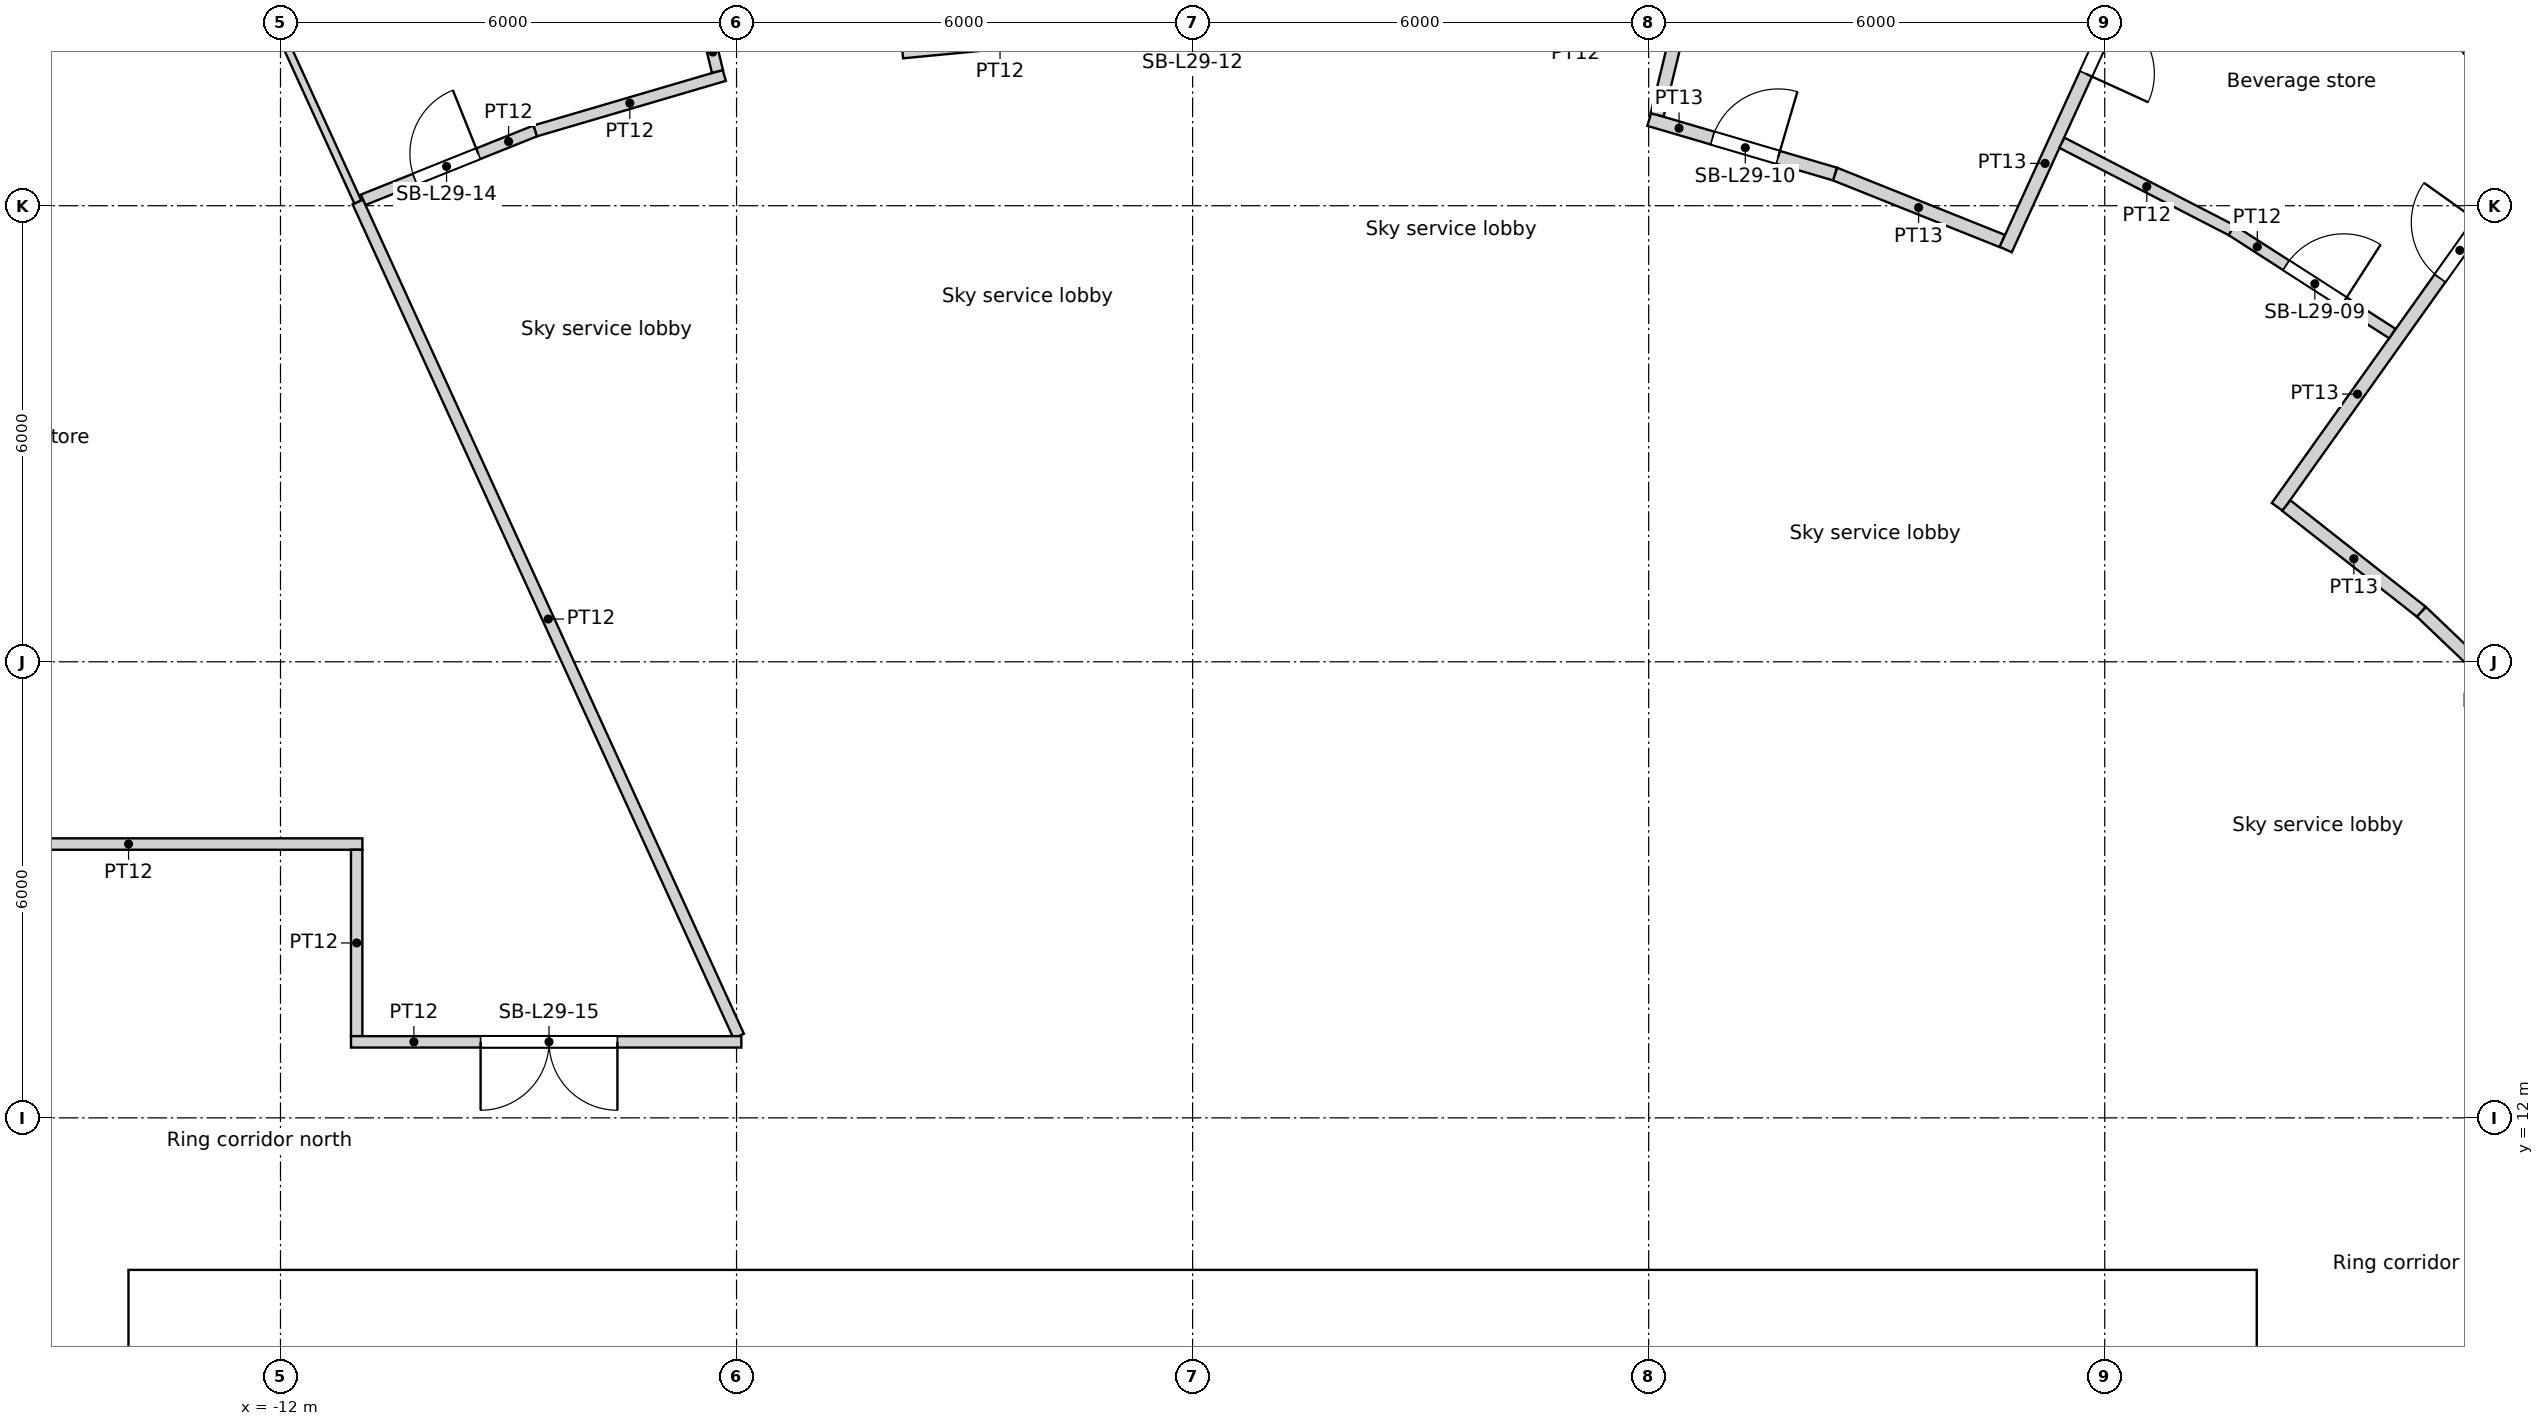
"""IFC4 building model, lengths in metres.
Left out: names, types, materials, properties, quantities, classifications, styles, units other than length and angle.
Written with IfcOpenShell. Run it as: python <this file> out.ifc"""

import sys

from ifc_helpers import new_model, si_unit, direction, frame, frame_2d, origin, origin_2d, place, context, subcontext, project, spatial, rectangle, circle, extrude, element, fill, save


model = new_model("IFC4")
c1 = context("Model", 3, precision=1e-05, world=origin(), true_north=direction((0.0, 1.0)))
c2 = subcontext(c1, "Body", "Model", "MODEL_VIEW")
j1 = project(units=[si_unit("LENGTHUNIT", "METRE"), si_unit("PLANEANGLEUNIT", "RADIAN")], contexts=[c1])
p1 = place(None, origin())
s1 = spatial("IfcSite", under=j1, at=p1, CompositionType="ELEMENT")
p2 = place(p1, origin())
s2 = spatial("IfcBuilding", under=s1, at=p2, CompositionType="ELEMENT")
p3 = place(p2, frame((0.0, 0.0, 114.6)))
s3 = spatial("IfcBuildingStorey", under=s2, at=p3, CompositionType="ELEMENT", Elevation=114.6)
p4 = place(p3, frame((-15.137, 26.219, 0.0), z_axis=(0.0, 0.0, 1.0), x_axis=(1.0, 0.0, 0.0)))
e1 = element("IfcColumn", 1, at=p4, inside=s3, PredefinedType="COLUMN", context=c2, shape_type="SweptSolid", body=[
    extrude(circle(Radius=0.6, at=origin_2d()), origin(), (0.0, 0.0, 1.0), 5.4),
])
for number, where, z_axis, x_axis in (
    (2, (14.659, 19.69, 0.0), (0.0, 0.0, 1.0), (1.0, 0.0, 0.0)),
    (3, (9.723, 22.54, 0.0), (0.0, 0.0, 1.0), (1.0, 0.0, 0.0)),
    (4, (4.263, 24.175, 0.0), (0.0, 0.0, 1.0), (1.0, 0.0, 0.0)),
    (5, (-1.427, 24.506, 0.0), (0.0, 0.0, 1.0), (1.0, 0.0, 0.0)),
    (6, (-7.04, 23.516, 0.0), (0.0, 0.0, 1.0), (1.0, 0.0, 0.0)),
    (7, (-12.274, 21.259, 0.0), (0.0, 0.0, 1.0), (1.0, 0.0, 0.0)),
):
    element("IfcColumn", number, at=place(p3, frame(where, z_axis=z_axis, x_axis=x_axis)), inside=s3, PredefinedType="COLUMN", context=c2, shape_type="SweptSolid", body=[
        extrude(circle(Radius=0.65, at=origin_2d()), origin(), (0.0, 0.0, 1.0), 5.4),
    ])
for number, where, z_axis, x_axis in (
    (8, (15.552, 10.603, 0.0), (0.0, 0.0, 1.0), (1.0, 0.0, 0.0)),
    (9, (11.735, 14.716, 0.0), (0.0, 0.0, 1.0), (1.0, 0.0, 0.0)),
    (10, (6.876, 17.521, 0.0), (0.0, 0.0, 1.0), (1.0, 0.0, 0.0)),
    (11, (1.406, 18.77, 0.0), (0.0, 0.0, 1.0), (1.0, 0.0, 0.0)),
    (12, (-4.188, 18.35, 0.0), (0.0, 0.0, 1.0), (1.0, 0.0, 0.0)),
    (13, (-9.411, 16.301, 0.0), (0.0, 0.0, 1.0), (1.0, 0.0, 0.0)),
    (14, (-13.798, 12.802, 0.0), (0.0, 0.0, 1.0), (1.0, 0.0, 0.0)),
):
    element("IfcColumn", number, at=place(p3, frame(where, z_axis=z_axis, x_axis=x_axis)), inside=s3, PredefinedType="COLUMN", context=c2, shape_type="SweptSolid", body=[
        extrude(circle(Radius=0.7, at=origin_2d()), origin(), (0.0, 0.0, 1.0), 5.4),
    ])
p5 = place(p3, frame((-14.0, 9.4, 0.0), z_axis=(0.0, 0.0, 1.0), x_axis=(1.0, 0.0, 0.0)))
e15 = element("IfcWall", 15, at=p5, inside=s3, PredefinedType="SOLIDWALL", context=c2, shape_type="SweptSolid", body=[
    extrude(rectangle(XDim=28.0, YDim=1.2, at=frame_2d((14.0, 0.0))), origin(), (0.0, 0.0, 1.0), 5.4),
])
p6 = place(p5, frame((9.8, 0.0, 0.0)))
e16 = element("IfcOpeningElement", 16, at=p6, cuts=e15, PredefinedType="OPENING", context=c2, shape_type="SweptSolid", body=[
    extrude(rectangle(XDim=1.8, YDim=2.1, at=frame_2d((0.9, 1.05))), frame((0.0, 0.6, 0.0), z_axis=(0.0, -1.0, 0.0), x_axis=(1.0, 0.0, 0.0)), (0.0, 0.0, 1.0), 1.2),
])
p7 = place(p3, frame((-13.021, 28.512, 0.0), z_axis=(0.0, 0.0, 1.0), x_axis=(0.415403363215, -0.909637315544, 0.0)))
e17 = element("IfcWall", 17, at=p7, inside=s3, PredefinedType="PARTITIONING", context=c2, shape_type="SweptSolid", body=[
    extrude(rectangle(XDim=4.906, YDim=0.1, at=frame_2d((2.453, 0.0))), origin(), (0.0, 0.0, 1.0), 4.0),
])
p8 = place(p3, frame((-10.998, 13.075, 0.0), z_axis=(0.0, 0.0, 1.0), x_axis=(0.0, 1.0, 0.0)))
e18 = element("IfcWall", 18, at=p8, inside=s3, PredefinedType="PARTITIONING", context=c2, shape_type="SweptSolid", body=[
    extrude(rectangle(XDim=2.452, YDim=0.15, at=frame_2d((1.226, 0.0))), origin(), (0.0, 0.0, 1.0), 4.0),
])
p9 = place(p3, frame((-10.923, 15.602, 0.0), z_axis=(0.0, 0.0, 1.0), x_axis=(-1.0, 0.0, 0.0)))
e19 = element("IfcWall", 19, at=p9, inside=s3, PredefinedType="PARTITIONING", context=c2, shape_type="SweptSolid", body=[
    extrude(rectangle(XDim=6.152, YDim=0.15, at=frame_2d((3.076, 0.0))), origin(), (0.0, 0.0, 1.0), 4.0),
])
p10 = place(p3, frame((-10.983, 24.05, 0.0), z_axis=(0.0, 0.0, 1.0), x_axis=(0.415416845748, -0.909631158365, 0.0)))
e20 = element("IfcWall", 20, at=p10, inside=s3, PredefinedType="PARTITIONING", context=c2, shape_type="SweptSolid", body=[
    extrude(rectangle(XDim=12.065, YDim=0.15, at=frame_2d((6.032, 0.0))), origin(), (0.0, 0.0, 1.0), 4.0),
])
p11 = place(p3, frame((-10.913, 24.077, 0.0), z_axis=(0.0, 0.0, 1.0), x_axis=(0.928366285294, 0.371666571445, 0.0)))
e21 = element("IfcWall", 21, at=p11, inside=s3, PredefinedType="PARTITIONING", context=c2, shape_type="SweptSolid", body=[
    extrude(rectangle(XDim=2.441, YDim=0.15, at=frame_2d((1.22, 0.0))), origin(), (0.0, 0.0, 1.0), 4.0),
])
p12 = place(p11, frame((0.733, 0.0, 0.0)))
e22 = element("IfcOpeningElement", 22, at=p12, cuts=e21, PredefinedType="OPENING", context=c2, shape_type="SweptSolid", body=[
    extrude(rectangle(XDim=0.9, YDim=2.1, at=frame_2d((0.45, 1.05))), frame((0.0, 0.075, 0.0), z_axis=(0.0, -1.0, 0.0), x_axis=(1.0, 0.0, 0.0)), (0.0, 0.0, 1.0), 0.15),
])
p13 = place(p3, frame((-6.375, 26.277, 0.0), z_axis=(0.0, 0.0, 1.0), x_axis=(0.235533543779, -0.971866220091, 0.0)))
e23 = element("IfcWall", 23, at=p13, inside=s3, PredefinedType="PARTITIONING", context=c2, shape_type="SweptSolid", body=[
    extrude(rectangle(XDim=0.526, YDim=0.15, at=frame_2d((0.263, 0.0))), origin(), (0.0, 0.0, 1.0), 4.0),
])
p14 = place(p3, frame((-6.161, 25.715, 0.0), z_axis=(0.0, 0.0, 1.0), x_axis=(-0.959492937384, -0.28173268023, 0.0)))
e24 = element("IfcWall", 24, at=p14, inside=s3, PredefinedType="PARTITIONING", context=c2, shape_type="SweptSolid", body=[
    extrude(rectangle(XDim=2.591, YDim=0.15, at=frame_2d((1.295, 0.0))), origin(), (0.0, 0.0, 1.0), 4.0),
])
p15 = place(p3, frame((-11.073, 13.0, 0.0), z_axis=(0.0, 0.0, 1.0), x_axis=(1.0, 0.0, 0.0)))
e25 = element("IfcWall", 25, at=p15, inside=s3, PredefinedType="PARTITIONING", context=c2, shape_type="SweptSolid", body=[
    extrude(rectangle(XDim=5.135, YDim=0.15, at=frame_2d((2.568, 0.0))), origin(), (0.0, 0.0, 1.0), 4.0),
])
p16 = place(p15, frame((1.705, 0.0, 0.0)))
e26 = element("IfcOpeningElement", 26, at=p16, cuts=e25, PredefinedType="OPENING", context=c2, shape_type="SweptSolid", body=[
    extrude(rectangle(XDim=1.8, YDim=2.4, at=frame_2d((0.9, 1.2))), frame((0.0, 0.075, 0.0), z_axis=(0.0, -1.0, 0.0), x_axis=(1.0, 0.0, 0.0)), (0.0, 0.0, 1.0), 0.15),
])
p17 = place(p3, frame((-1.251, 26.259, 0.0), z_axis=(0.0, 0.0, 1.0), x_axis=(-0.995473727837, -0.095037135829, 0.0)))
e27 = element("IfcWall", 27, at=p17, inside=s3, PredefinedType="PARTITIONING", context=c2, shape_type="SweptSolid", body=[
    extrude(rectangle(XDim=2.577, YDim=0.15, at=frame_2d((1.288, 0.0))), origin(), (0.0, 0.0, 1.0), 4.0),
])
p18 = place(p3, frame((7.39, 30.461, 0.0), z_axis=(0.0, 0.0, 1.0), x_axis=(-0.235734136945, -0.971817584055, 0.0)))
e28 = element("IfcWall", 28, at=p18, inside=s3, PredefinedType="PARTITIONING", context=c2, shape_type="SweptSolid", body=[
    extrude(rectangle(XDim=5.418, YDim=0.175, at=frame_2d((2.709, 0.0))), origin(), (0.0, 0.0, 1.0), 4.0),
])
p19 = place(p3, frame((6.008, 25.135, 0.0), z_axis=(0.0, 0.0, 1.0), x_axis=(0.959475355364, -0.281792552155, 0.0)))
e29 = element("IfcWall", 29, at=p19, inside=s3, PredefinedType="PARTITIONING", context=c2, shape_type="SweptSolid", body=[
    extrude(rectangle(XDim=2.546, YDim=0.175, at=frame_2d((1.273, 0.0))), origin(), (0.0, 0.0, 1.0), 4.0),
])
p20 = place(p19, frame((0.867, 0.0, 0.0)))
e30 = element("IfcOpeningElement", 30, at=p20, cuts=e29, PredefinedType="OPENING", context=c2, shape_type="SweptSolid", body=[
    extrude(rectangle(XDim=0.9, YDim=2.1, at=frame_2d((0.45, 1.05))), frame((0.0, 0.087, 0.0), z_axis=(0.0, -1.0, 0.0), x_axis=(1.0, 0.0, 0.0)), (0.0, 0.0, 1.0), 0.175),
])
p21 = place(p3, frame((10.652, 23.536, 0.0), z_axis=(0.0, 0.0, 1.0), x_axis=(-0.928377260399, 0.371639156137, 0.0)))
e31 = element("IfcWall", 31, at=p21, inside=s3, PredefinedType="PARTITIONING", context=c2, shape_type="SweptSolid", body=[
    extrude(rectangle(XDim=2.372, YDim=0.175, at=frame_2d((1.186, 0.0))), origin(), (0.0, 0.0, 1.0), 4.0),
])
p22 = place(p3, frame((10.697, 23.424, 0.0), z_axis=(0.0, 0.0, 1.0), x_axis=(0.415406978867, 0.909635664378, 0.0)))
e32 = element("IfcWall", 32, at=p22, inside=s3, PredefinedType="PARTITIONING", context=c2, shape_type="SweptSolid", body=[
    extrude(rectangle(XDim=5.594, YDim=0.175, at=frame_2d((2.797, 0.0))), origin(), (0.0, 0.0, 1.0), 4.0),
])
p23 = place(p22, frame((2.542, 0.0, 0.0)))
e33 = element("IfcOpeningElement", 33, at=p23, cuts=e32, PredefinedType="OPENING", context=c2, shape_type="SweptSolid", body=[
    extrude(rectangle(XDim=0.9, YDim=2.1, at=frame_2d((0.45, 1.05))), frame((0.0, 0.087, 0.0), z_axis=(0.0, -1.0, 0.0), x_axis=(1.0, 0.0, 0.0)), (0.0, 0.0, 1.0), 0.175),
])
p24 = place(p3, frame((13.67, 23.677, 0.0), z_axis=(0.0, 0.0, 1.0), x_axis=(-0.8888594416, 0.458179978916, 0.0)))
e34 = element("IfcWall", 34, at=p24, inside=s3, PredefinedType="PARTITIONING", context=c2, shape_type="SweptSolid", body=[
    extrude(rectangle(XDim=2.512, YDim=0.15, at=frame_2d((1.256, 0.0))), origin(), (0.0, 0.0, 1.0), 4.0),
])
p25 = place(p3, frame((13.67, 23.677, 0.0), z_axis=(0.0, 0.0, 1.0), x_axis=(0.841232144756, -0.540674096503, 0.0)))
e35 = element("IfcWall", 35, at=p25, inside=s3, PredefinedType="PARTITIONING", context=c2, shape_type="SweptSolid", body=[
    extrude(rectangle(XDim=2.512, YDim=0.15, at=frame_2d((1.256, 0.0))), origin(), (0.0, 0.0, 1.0), 4.0),
])
p26 = place(p25, frame((0.851, 0.0, 0.0)))
e36 = element("IfcOpeningElement", 36, at=p26, cuts=e35, PredefinedType="OPENING", context=c2, shape_type="SweptSolid", body=[
    extrude(rectangle(XDim=0.9, YDim=2.1, at=frame_2d((0.45, 1.05))), frame((0.0, 0.075, 0.0), z_axis=(0.0, -1.0, 0.0), x_axis=(1.0, 0.0, 0.0)), (0.0, 0.0, 1.0), 0.15),
])
p27 = place(p3, frame((16.167, 18.657, 0.0), z_axis=(0.0, 0.0, 1.0), x_axis=(-0.786033588145, 0.618183790072, 0.0)))
e37 = element("IfcWall", 37, at=p27, inside=s3, PredefinedType="PARTITIONING", context=c2, shape_type="SweptSolid", body=[
    extrude(rectangle(XDim=2.262, YDim=0.175, at=frame_2d((1.131, 0.0))), origin(), (0.0, 0.0, 1.0), 4.0),
])
p28 = place(p3, frame((17.867, 17.036, 0.0), z_axis=(0.0, 0.0, 1.0), x_axis=(-0.72374237325, 0.690070269728, 0.0)))
e38 = element("IfcWall", 38, at=p28, inside=s3, PredefinedType="PARTITIONING", context=c2, shape_type="SweptSolid", body=[
    extrude(rectangle(XDim=2.349, YDim=0.175, at=frame_2d((1.175, 0.0))), origin(), (0.0, 0.0, 1.0), 4.0),
])
p29 = place(p3, frame((14.269, 20.038, 0.0), z_axis=(0.0, 0.0, 1.0), x_axis=(0.580039185879, 0.814588572744, 0.0)))
e39 = element("IfcWall", 39, at=p29, inside=s3, PredefinedType="PARTITIONING", context=c2, shape_type="SweptSolid", body=[
    extrude(rectangle(XDim=6.745, YDim=0.175, at=frame_2d((3.373, 0.0))), origin(), (0.0, 0.0, 1.0), 4.0),
])
p30 = place(p29, frame((3.693, 0.0, 0.0)))
e40 = element("IfcOpeningElement", 40, at=p30, cuts=e39, PredefinedType="OPENING", context=c2, shape_type="SweptSolid", body=[
    extrude(rectangle(XDim=0.9, YDim=2.1, at=frame_2d((0.45, 1.05))), frame((0.0, 0.087, 0.0), z_axis=(0.0, -1.0, 0.0), x_axis=(1.0, 0.0, 0.0)), (0.0, 0.0, 1.0), 0.175),
])
p31 = place(p6, origin())
e41 = element("IfcDoor", 41, at=p31, inside=s3, OperationType="DOUBLE_DOOR_SINGLE_SWING", PredefinedType="DOOR", context=c2, shape_type="SweptSolid", body=[
    extrude(rectangle(XDim=1.8, YDim=2.1, at=frame_2d((0.9, 1.05))), frame((0.0, 0.025, 0.0), z_axis=(0.0, -1.0, 0.0), x_axis=(1.0, 0.0, 0.0)), (0.0, 0.0, 1.0), 0.05),
])
fill(e16, e41)
p32 = place(p30, origin())
e42 = element("IfcDoor", 42, at=p32, inside=s3, OperationType="SINGLE_SWING_RIGHT", PredefinedType="DOOR", context=c2, shape_type="SweptSolid", body=[
    extrude(rectangle(XDim=0.9, YDim=2.1, at=frame_2d((0.45, 1.05))), frame((0.0, 0.025, 0.0), z_axis=(0.0, -1.0, 0.0), x_axis=(1.0, 0.0, 0.0)), (0.0, 0.0, 1.0), 0.05),
])
fill(e40, e42)
p33 = place(p23, origin())
e43 = element("IfcDoor", 43, at=p33, inside=s3, OperationType="SINGLE_SWING_RIGHT", PredefinedType="DOOR", context=c2, shape_type="SweptSolid", body=[
    extrude(rectangle(XDim=0.9, YDim=2.1, at=frame_2d((0.45, 1.05))), frame((0.0, 0.025, 0.0), z_axis=(0.0, -1.0, 0.0), x_axis=(1.0, 0.0, 0.0)), (0.0, 0.0, 1.0), 0.05),
])
fill(e33, e43)
p34 = place(p26, origin())
e44 = element("IfcDoor", 44, at=p34, inside=s3, OperationType="SINGLE_SWING_RIGHT", PredefinedType="DOOR", context=c2, shape_type="SweptSolid", body=[
    extrude(rectangle(XDim=0.9, YDim=2.1, at=frame_2d((0.45, 1.05))), frame((0.0, 0.025, 0.0), z_axis=(0.0, -1.0, 0.0), x_axis=(1.0, 0.0, 0.0)), (0.0, 0.0, 1.0), 0.05),
])
fill(e36, e44)
p35 = place(p20, origin())
e45 = element("IfcDoor", 45, at=p35, inside=s3, OperationType="SINGLE_SWING_RIGHT", PredefinedType="DOOR", context=c2, shape_type="SweptSolid", body=[
    extrude(rectangle(XDim=0.9, YDim=2.1, at=frame_2d((0.45, 1.05))), frame((0.0, 0.025, 0.0), z_axis=(0.0, -1.0, 0.0), x_axis=(1.0, 0.0, 0.0)), (0.0, 0.0, 1.0), 0.05),
])
fill(e30, e45)
p36 = place(p12, origin())
e46 = element("IfcDoor", 46, at=p36, inside=s3, OperationType="SINGLE_SWING_RIGHT", PredefinedType="DOOR", context=c2, shape_type="SweptSolid", body=[
    extrude(rectangle(XDim=0.9, YDim=2.1, at=frame_2d((0.45, 1.05))), frame((0.0, 0.025, 0.0), z_axis=(0.0, -1.0, 0.0), x_axis=(1.0, 0.0, 0.0)), (0.0, 0.0, 1.0), 0.05),
])
fill(e22, e46)
p37 = place(p16, origin())
e47 = element("IfcDoor", 47, at=p37, inside=s3, OperationType="DOUBLE_DOOR_SINGLE_SWING", PredefinedType="DOOR", context=c2, shape_type="SweptSolid", body=[
    extrude(rectangle(XDim=1.8, YDim=2.4, at=frame_2d((0.9, 1.2))), frame((0.0, 0.025, 0.0), z_axis=(0.0, -1.0, 0.0), x_axis=(1.0, 0.0, 0.0)), (0.0, 0.0, 1.0), 0.05),
])
fill(e26, e47)
save(model, sys.argv[1])
